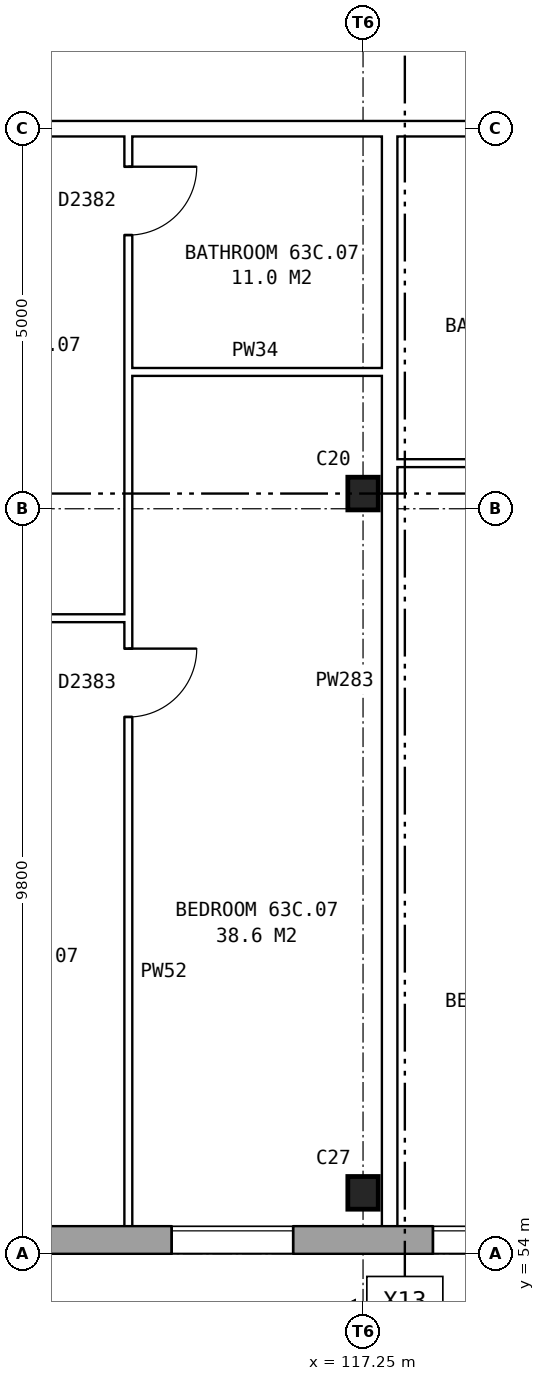
"""IFC4 building model, lengths in metres.
Left out: names, types, materials, properties, quantities, classifications, styles, units other than length and angle.
Written with IfcOpenShell. Run it as: python <this file> out.ifc"""

import sys

from ifc_helpers import new_model, si_unit, direction, frame, frame_2d, origin, origin_2d, place, context, subcontext, project, spatial, rectangle, i_section, extrude, element, fill, save


model = new_model("IFC4")
c1 = context("Model", 3, precision=1e-05, world=origin(), true_north=direction((0.0, 1.0)))
c2 = subcontext(c1, "Body", "Model", "MODEL_VIEW")
j1 = project(units=[si_unit("LENGTHUNIT", "METRE"), si_unit("PLANEANGLEUNIT", "RADIAN")], contexts=[c1])
p1 = place(None, origin())
s1 = spatial("IfcSite", under=j1, at=p1, CompositionType="ELEMENT")
p2 = place(p1, origin())
s2 = spatial("IfcBuilding", under=s1, at=p2, CompositionType="ELEMENT")
p3 = place(p2, frame((0.0, 0.0, 224.5)))
s3 = spatial("IfcBuildingStorey", under=s2, at=p3, CompositionType="ELEMENT", Elevation=224.5)
for number, where, z_axis, x_axis in (
    (1, (117.25, 54.8, 0.0), (0.0, 0.0, 1.0), (1.0, 0.0, 0.0)),
    (2, (117.25, 64.0, 0.0), (0.0, 0.0, 1.0), (1.0, 0.0, 0.0)),
):
    element("IfcColumn", number, at=place(p3, frame(where, z_axis=z_axis, x_axis=x_axis)), inside=s3, PredefinedType="COLUMN", context=c2, shape_type="SweptSolid", body=[
        extrude(i_section(OverallWidth=0.4, OverallDepth=0.43, WebThickness=0.04, FlangeThickness=0.04, at=origin_2d()), origin(), (0.0, 0.0, 1.0), 2.85),
    ])
p4 = place(p3, frame((75.95, 54.18, 0.0), z_axis=(0.0, 0.0, 1.0), x_axis=(1.0, 0.0, 0.0)))
e3 = element("IfcWall", 3, at=p4, inside=s3, PredefinedType="STANDARD", context=c2, shape_type="SweptSolid", body=[
    extrude(rectangle(XDim=55.1, YDim=0.36, at=frame_2d((27.55, 0.0))), origin(), (0.0, 0.0, 1.0), 2.85),
])
p5 = place(p4, frame((0.969, 0.0, 0.8)))
e4 = element("IfcOpeningElement", 4, at=p5, cuts=e3, PredefinedType="OPENING", context=c2, shape_type="SweptSolid", body=[
    extrude(rectangle(XDim=1.6, YDim=1.8, at=frame_2d((0.8, 0.9))), frame((0.0, 0.19, 0.0), z_axis=(0.0, -1.0, 0.0), x_axis=(1.0, 0.0, 0.0)), (0.0, 0.0, 1.0), 0.38),
])
p6 = place(p4, frame((4.406, 0.0, 0.8)))
e5 = element("IfcOpeningElement", 5, at=p6, cuts=e3, PredefinedType="OPENING", context=c2, shape_type="SweptSolid", body=[
    extrude(rectangle(XDim=1.6, YDim=1.8, at=frame_2d((0.8, 0.9))), frame((0.0, 0.19, 0.0), z_axis=(0.0, -1.0, 0.0), x_axis=(1.0, 0.0, 0.0)), (0.0, 0.0, 1.0), 0.38),
])
p7 = place(p4, frame((7.844, 0.0, 0.8)))
e6 = element("IfcOpeningElement", 6, at=p7, cuts=e3, PredefinedType="OPENING", context=c2, shape_type="SweptSolid", body=[
    extrude(rectangle(XDim=1.6, YDim=1.8, at=frame_2d((0.8, 0.9))), frame((0.0, 0.19, 0.0), z_axis=(0.0, -1.0, 0.0), x_axis=(1.0, 0.0, 0.0)), (0.0, 0.0, 1.0), 0.38),
])
p8 = place(p4, frame((11.281, 0.0, 0.8)))
e7 = element("IfcOpeningElement", 7, at=p8, cuts=e3, PredefinedType="OPENING", context=c2, shape_type="SweptSolid", body=[
    extrude(rectangle(XDim=1.6, YDim=1.8, at=frame_2d((0.8, 0.9))), frame((0.0, 0.19, 0.0), z_axis=(0.0, -1.0, 0.0), x_axis=(1.0, 0.0, 0.0)), (0.0, 0.0, 1.0), 0.38),
])
p9 = place(p4, frame((14.719, 0.0, 0.8)))
e8 = element("IfcOpeningElement", 8, at=p9, cuts=e3, PredefinedType="OPENING", context=c2, shape_type="SweptSolid", body=[
    extrude(rectangle(XDim=1.6, YDim=1.8, at=frame_2d((0.8, 0.9))), frame((0.0, 0.19, 0.0), z_axis=(0.0, -1.0, 0.0), x_axis=(1.0, 0.0, 0.0)), (0.0, 0.0, 1.0), 0.38),
])
p10 = place(p4, frame((18.156, 0.0, 0.8)))
e9 = element("IfcOpeningElement", 9, at=p10, cuts=e3, PredefinedType="OPENING", context=c2, shape_type="SweptSolid", body=[
    extrude(rectangle(XDim=1.6, YDim=1.8, at=frame_2d((0.8, 0.9))), frame((0.0, 0.19, 0.0), z_axis=(0.0, -1.0, 0.0), x_axis=(1.0, 0.0, 0.0)), (0.0, 0.0, 1.0), 0.38),
])
p11 = place(p4, frame((21.594, 0.0, 0.8)))
e10 = element("IfcOpeningElement", 10, at=p11, cuts=e3, PredefinedType="OPENING", context=c2, shape_type="SweptSolid", body=[
    extrude(rectangle(XDim=1.6, YDim=1.8, at=frame_2d((0.8, 0.9))), frame((0.0, 0.19, 0.0), z_axis=(0.0, -1.0, 0.0), x_axis=(1.0, 0.0, 0.0)), (0.0, 0.0, 1.0), 0.38),
])
p12 = place(p4, frame((25.031, 0.0, 0.8)))
e11 = element("IfcOpeningElement", 11, at=p12, cuts=e3, PredefinedType="OPENING", context=c2, shape_type="SweptSolid", body=[
    extrude(rectangle(XDim=1.6, YDim=1.8, at=frame_2d((0.8, 0.9))), frame((0.0, 0.19, 0.0), z_axis=(0.0, -1.0, 0.0), x_axis=(1.0, 0.0, 0.0)), (0.0, 0.0, 1.0), 0.38),
])
p13 = place(p4, frame((28.469, 0.0, 0.8)))
e12 = element("IfcOpeningElement", 12, at=p13, cuts=e3, PredefinedType="OPENING", context=c2, shape_type="SweptSolid", body=[
    extrude(rectangle(XDim=1.6, YDim=1.8, at=frame_2d((0.8, 0.9))), frame((0.0, 0.19, 0.0), z_axis=(0.0, -1.0, 0.0), x_axis=(1.0, 0.0, 0.0)), (0.0, 0.0, 1.0), 0.38),
])
p14 = place(p4, frame((31.906, 0.0, 0.8)))
e13 = element("IfcOpeningElement", 13, at=p14, cuts=e3, PredefinedType="OPENING", context=c2, shape_type="SweptSolid", body=[
    extrude(rectangle(XDim=1.6, YDim=1.8, at=frame_2d((0.8, 0.9))), frame((0.0, 0.19, 0.0), z_axis=(0.0, -1.0, 0.0), x_axis=(1.0, 0.0, 0.0)), (0.0, 0.0, 1.0), 0.38),
])
p15 = place(p4, frame((35.344, 0.0, 0.8)))
e14 = element("IfcOpeningElement", 14, at=p15, cuts=e3, PredefinedType="OPENING", context=c2, shape_type="SweptSolid", body=[
    extrude(rectangle(XDim=1.6, YDim=1.8, at=frame_2d((0.8, 0.9))), frame((0.0, 0.19, 0.0), z_axis=(0.0, -1.0, 0.0), x_axis=(1.0, 0.0, 0.0)), (0.0, 0.0, 1.0), 0.38),
])
p16 = place(p4, frame((38.781, 0.0, 0.8)))
e15 = element("IfcOpeningElement", 15, at=p16, cuts=e3, PredefinedType="OPENING", context=c2, shape_type="SweptSolid", body=[
    extrude(rectangle(XDim=1.6, YDim=1.8, at=frame_2d((0.8, 0.9))), frame((0.0, 0.19, 0.0), z_axis=(0.0, -1.0, 0.0), x_axis=(1.0, 0.0, 0.0)), (0.0, 0.0, 1.0), 0.38),
])
p17 = place(p4, frame((42.219, 0.0, 0.8)))
e16 = element("IfcOpeningElement", 16, at=p17, cuts=e3, PredefinedType="OPENING", context=c2, shape_type="SweptSolid", body=[
    extrude(rectangle(XDim=1.6, YDim=1.8, at=frame_2d((0.8, 0.9))), frame((0.0, 0.19, 0.0), z_axis=(0.0, -1.0, 0.0), x_axis=(1.0, 0.0, 0.0)), (0.0, 0.0, 1.0), 0.38),
])
p18 = place(p4, frame((45.656, 0.0, 0.8)))
e17 = element("IfcOpeningElement", 17, at=p18, cuts=e3, PredefinedType="OPENING", context=c2, shape_type="SweptSolid", body=[
    extrude(rectangle(XDim=1.6, YDim=1.8, at=frame_2d((0.8, 0.9))), frame((0.0, 0.19, 0.0), z_axis=(0.0, -1.0, 0.0), x_axis=(1.0, 0.0, 0.0)), (0.0, 0.0, 1.0), 0.38),
])
p19 = place(p4, frame((49.094, 0.0, 0.8)))
e18 = element("IfcOpeningElement", 18, at=p19, cuts=e3, PredefinedType="OPENING", context=c2, shape_type="SweptSolid", body=[
    extrude(rectangle(XDim=1.6, YDim=1.8, at=frame_2d((0.8, 0.9))), frame((0.0, 0.19, 0.0), z_axis=(0.0, -1.0, 0.0), x_axis=(1.0, 0.0, 0.0)), (0.0, 0.0, 1.0), 0.38),
])
p20 = place(p4, frame((52.531, 0.0, 0.8)))
e19 = element("IfcOpeningElement", 19, at=p20, cuts=e3, PredefinedType="OPENING", context=c2, shape_type="SweptSolid", body=[
    extrude(rectangle(XDim=1.6, YDim=1.8, at=frame_2d((0.8, 0.9))), frame((0.0, 0.19, 0.0), z_axis=(0.0, -1.0, 0.0), x_axis=(1.0, 0.0, 0.0)), (0.0, 0.0, 1.0), 0.38),
])
p21 = place(p3, frame((110.825, 62.36, 0.0), z_axis=(0.0, 0.0, 1.0), x_axis=(1.0, 0.0, 0.0)))
e20 = element("IfcWall", 20, at=p21, inside=s3, PredefinedType="PARTITIONING", context=c2, shape_type="SweptSolid", body=[
    extrude(rectangle(XDim=3.337, YDim=0.1, at=frame_2d((1.668, 0.0))), origin(), (0.0, 0.0, 1.0), 2.85),
])
p22 = place(p21, frame((1.219, 0.0, 0.0)))
e21 = element("IfcOpeningElement", 21, at=p22, cuts=e20, PredefinedType="OPENING", context=c2, shape_type="SweptSolid", body=[
    extrude(rectangle(XDim=0.9, YDim=2.1, at=frame_2d((0.45, 1.05))), frame((0.0, 0.06, 0.0), z_axis=(0.0, -1.0, 0.0), x_axis=(1.0, 0.0, 0.0)), (0.0, 0.0, 1.0), 0.12),
])
p23 = place(p3, frame((117.7, 64.4, 0.0), z_axis=(0.0, 0.0, 1.0), x_axis=(1.0, 0.0, 0.0)))
e22 = element("IfcWall", 22, at=p23, inside=s3, PredefinedType="PARTITIONING", context=c2, shape_type="SweptSolid", body=[
    extrude(rectangle(XDim=3.337, YDim=0.1, at=frame_2d((1.668, 0.0))), origin(), (0.0, 0.0, 1.0), 2.85),
])
p24 = place(p3, frame((114.162, 65.6, 0.0), z_axis=(0.0, 0.0, 1.0), x_axis=(1.0, 0.0, 0.0)))
e23 = element("IfcWall", 23, at=p24, inside=s3, PredefinedType="PARTITIONING", context=c2, shape_type="SweptSolid", body=[
    extrude(rectangle(XDim=3.338, YDim=0.1, at=frame_2d((1.669, 0.0))), origin(), (0.0, 0.0, 1.0), 2.85),
])
p25 = place(p3, frame((75.64, 68.8, 0.0), z_axis=(0.0, 0.0, 1.0), x_axis=(1.0, 0.0, 0.0)))
e24 = element("IfcWall", 24, at=p25, inside=s3, PredefinedType="PARTITIONING", context=c2, shape_type="SweptSolid", body=[
    extrude(rectangle(XDim=55.72, YDim=0.2, at=frame_2d((27.86, 0.0))), origin(), (0.0, 0.0, 1.0), 2.85),
])
p26 = place(p25, frame((1.399, 0.0, 0.0)))
e25 = element("IfcOpeningElement", 25, at=p26, cuts=e24, PredefinedType="OPENING", context=c2, shape_type="SweptSolid", body=[
    extrude(rectangle(XDim=1.0, YDim=2.1, at=frame_2d((0.5, 1.05))), frame((0.0, 0.11, 0.0), z_axis=(0.0, -1.0, 0.0), x_axis=(1.0, 0.0, 0.0)), (0.0, 0.0, 1.0), 0.22),
])
p27 = place(p25, frame((12.241, 0.0, 0.0)))
e26 = element("IfcOpeningElement", 26, at=p27, cuts=e24, PredefinedType="OPENING", context=c2, shape_type="SweptSolid", body=[
    extrude(rectangle(XDim=1.0, YDim=2.1, at=frame_2d((0.5, 1.05))), frame((0.0, 0.11, 0.0), z_axis=(0.0, -1.0, 0.0), x_axis=(1.0, 0.0, 0.0)), (0.0, 0.0, 1.0), 0.22),
])
p28 = place(p25, frame((22.553, 0.0, 0.0)))
e27 = element("IfcOpeningElement", 27, at=p28, cuts=e24, PredefinedType="OPENING", context=c2, shape_type="SweptSolid", body=[
    extrude(rectangle(XDim=1.0, YDim=2.1, at=frame_2d((0.5, 1.05))), frame((0.0, 0.11, 0.0), z_axis=(0.0, -1.0, 0.0), x_axis=(1.0, 0.0, 0.0)), (0.0, 0.0, 1.0), 0.22),
])
p29 = place(p25, frame((32.866, 0.0, 0.0)))
e28 = element("IfcOpeningElement", 28, at=p29, cuts=e24, PredefinedType="OPENING", context=c2, shape_type="SweptSolid", body=[
    extrude(rectangle(XDim=1.0, YDim=2.1, at=frame_2d((0.5, 1.05))), frame((0.0, 0.11, 0.0), z_axis=(0.0, -1.0, 0.0), x_axis=(1.0, 0.0, 0.0)), (0.0, 0.0, 1.0), 0.22),
])
p30 = place(p25, frame((36.303, 0.0, 0.0)))
e29 = element("IfcOpeningElement", 29, at=p30, cuts=e24, PredefinedType="OPENING", context=c2, shape_type="SweptSolid", body=[
    extrude(rectangle(XDim=1.0, YDim=2.1, at=frame_2d((0.5, 1.05))), frame((0.0, 0.11, 0.0), z_axis=(0.0, -1.0, 0.0), x_axis=(1.0, 0.0, 0.0)), (0.0, 0.0, 1.0), 0.22),
])
p31 = place(p25, frame((46.616, 0.0, 0.0)))
e30 = element("IfcOpeningElement", 30, at=p31, cuts=e24, PredefinedType="OPENING", context=c2, shape_type="SweptSolid", body=[
    extrude(rectangle(XDim=1.0, YDim=2.1, at=frame_2d((0.5, 1.05))), frame((0.0, 0.11, 0.0), z_axis=(0.0, -1.0, 0.0), x_axis=(1.0, 0.0, 0.0)), (0.0, 0.0, 1.0), 0.22),
])
p32 = place(p25, frame((50.053, 0.0, 0.0)))
e31 = element("IfcOpeningElement", 31, at=p32, cuts=e24, PredefinedType="OPENING", context=c2, shape_type="SweptSolid", body=[
    extrude(rectangle(XDim=1.0, YDim=2.1, at=frame_2d((0.5, 1.05))), frame((0.0, 0.11, 0.0), z_axis=(0.0, -1.0, 0.0), x_axis=(1.0, 0.0, 0.0)), (0.0, 0.0, 1.0), 0.22),
])
p33 = place(p3, frame((114.162, 54.36, 0.0), z_axis=(0.0, 0.0, 1.0), x_axis=(0.0, 1.0, 0.0)))
e32 = element("IfcWall", 32, at=p33, inside=s3, PredefinedType="PARTITIONING", context=c2, shape_type="SweptSolid", body=[
    extrude(rectangle(XDim=14.34, YDim=0.1, at=frame_2d((7.17, 0.0))), origin(), (0.0, 0.0, 1.0), 2.85),
])
p34 = place(p33, frame((6.7, 0.0, 0.0)))
e33 = element("IfcOpeningElement", 33, at=p34, cuts=e32, PredefinedType="OPENING", context=c2, shape_type="SweptSolid", body=[
    extrude(rectangle(XDim=0.9, YDim=2.1, at=frame_2d((0.45, 1.05))), frame((0.0, 0.06, 0.0), z_axis=(0.0, -1.0, 0.0), x_axis=(1.0, 0.0, 0.0)), (0.0, 0.0, 1.0), 0.12),
])
p35 = place(p33, frame((13.04, 0.0, 0.0)))
e34 = element("IfcOpeningElement", 34, at=p35, cuts=e32, PredefinedType="OPENING", context=c2, shape_type="SweptSolid", body=[
    extrude(rectangle(XDim=0.9, YDim=2.1, at=frame_2d((0.45, 1.05))), frame((0.0, 0.06, 0.0), z_axis=(0.0, -1.0, 0.0), x_axis=(1.0, 0.0, 0.0)), (0.0, 0.0, 1.0), 0.12),
])
p36 = place(p3, frame((117.6, 54.36, 0.0), z_axis=(0.0, 0.0, 1.0), x_axis=(0.0, 1.0, 0.0)))
e35 = element("IfcWall", 35, at=p36, inside=s3, PredefinedType="PARTITIONING", context=c2, shape_type="SweptSolid", body=[
    extrude(rectangle(XDim=14.34, YDim=0.2, at=frame_2d((7.17, 0.0))), origin(), (0.0, 0.0, 1.0), 2.85),
])
p37 = place(p16, origin())
e36 = element("IfcWindow", 36, at=p37, inside=s3, PartitioningType="SINGLE_PANEL", PredefinedType="WINDOW", context=c2, shape_type="SweptSolid", body=[
    extrude(rectangle(XDim=1.6, YDim=1.8, at=frame_2d((0.8, 0.9))), frame((0.0, 0.15, 0.0), z_axis=(0.0, -1.0, 0.0), x_axis=(1.0, 0.0, 0.0)), (0.0, 0.0, 1.0), 0.06),
])
fill(e15, e36)
p38 = place(p17, origin())
e37 = element("IfcWindow", 37, at=p38, inside=s3, PartitioningType="SINGLE_PANEL", PredefinedType="WINDOW", context=c2, shape_type="SweptSolid", body=[
    extrude(rectangle(XDim=1.6, YDim=1.8, at=frame_2d((0.8, 0.9))), frame((0.0, 0.15, 0.0), z_axis=(0.0, -1.0, 0.0), x_axis=(1.0, 0.0, 0.0)), (0.0, 0.0, 1.0), 0.06),
])
fill(e16, e37)
p39 = place(p34, frame((0.9, 0.0, 0.0), z_axis=(0.0, 0.0, 1.0), x_axis=(-1.0, 0.0, 0.0)))
e38 = element("IfcDoor", 38, at=p39, inside=s3, OperationType="SINGLE_SWING_LEFT", PredefinedType="DOOR", context=c2, shape_type="SweptSolid", body=[
    extrude(rectangle(XDim=0.9, YDim=2.1, at=frame_2d((0.45, 1.05))), frame((0.0, 0.025, 0.0), z_axis=(0.0, -1.0, 0.0), x_axis=(1.0, 0.0, 0.0)), (0.0, 0.0, 1.0), 0.05),
])
fill(e33, e38)
p40 = place(p35, frame((0.9, 0.0, 0.0), z_axis=(0.0, 0.0, 1.0), x_axis=(-1.0, 0.0, 0.0)))
e39 = element("IfcDoor", 39, at=p40, inside=s3, OperationType="SINGLE_SWING_LEFT", PredefinedType="DOOR", context=c2, shape_type="SweptSolid", body=[
    extrude(rectangle(XDim=0.9, YDim=2.1, at=frame_2d((0.45, 1.05))), frame((0.0, 0.025, 0.0), z_axis=(0.0, -1.0, 0.0), x_axis=(1.0, 0.0, 0.0)), (0.0, 0.0, 1.0), 0.05),
])
fill(e34, e39)
save(model, sys.argv[1])
